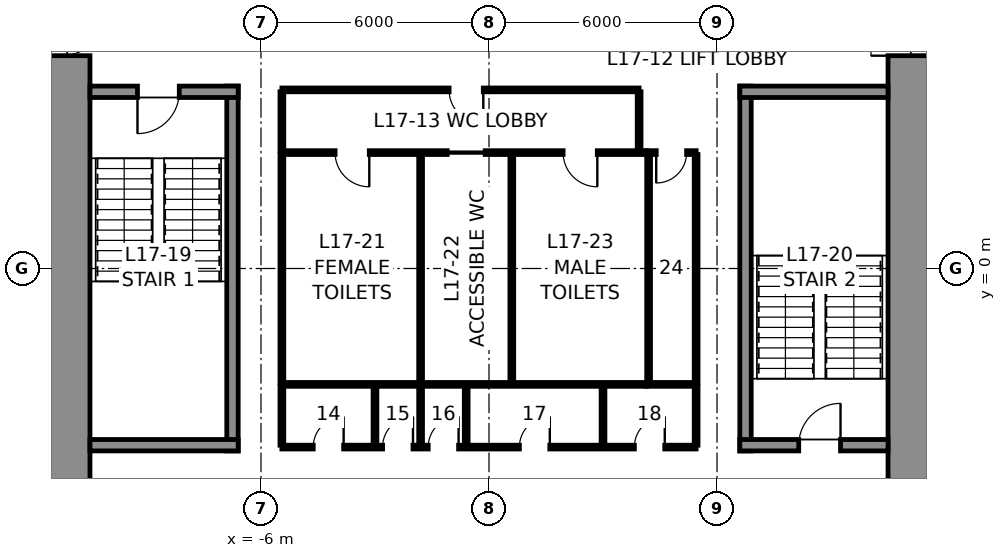
"""IFC4 building model, lengths in metres.
Left out: names, types, materials, properties, quantities, classifications, styles, units other than length and angle.
Written with IfcOpenShell. Run it as: python <this file> out.ifc"""

import sys

from ifc_helpers import new_model, si_unit, direction, frame, frame_2d, origin, place, context, subcontext, project, spatial, rectangle, extrude, element, fill, save


model = new_model("IFC4")
c1 = context("Model", 3, precision=1e-05, world=origin(), true_north=direction((0.0, 1.0)))
c2 = subcontext(c1, "Body", "Model", "MODEL_VIEW")
j1 = project(units=[si_unit("LENGTHUNIT", "METRE"), si_unit("PLANEANGLEUNIT", "RADIAN")], contexts=[c1])
p1 = place(None, origin())
s1 = spatial("IfcSite", under=j1, at=p1, CompositionType="ELEMENT")
p2 = place(p1, origin())
s2 = spatial("IfcBuilding", under=s1, at=p2, CompositionType="ELEMENT")
p3 = place(p2, frame((0.0, 0.0, 90.6)))
s3 = spatial("IfcBuildingStorey", under=s2, at=p3, CompositionType="ELEMENT", Elevation=90.6)
p4 = place(p3, frame((11.25, 10.5, 0.0), z_axis=(0.0, 0.0, 1.0), x_axis=(0.0, -1.0, 0.0)))
e1 = element("IfcWall", 1, at=p4, inside=s3, PredefinedType="SHEAR", context=c2, shape_type="SweptSolid", body=[
    extrude(rectangle(XDim=21.0, YDim=1.5, at=frame_2d((10.5, 0.0))), origin(), (0.0, 0.0, 1.0), 4.6),
])
p5 = place(p4, frame((3.7, 0.0, 0.0)))
e2 = element("IfcOpeningElement", 2, at=p5, cuts=e1, PredefinedType="OPENING", context=c2, shape_type="SweptSolid", body=[
    extrude(rectangle(XDim=1.2, YDim=2.3, at=frame_2d((0.6, 1.15))), frame((0.0, 0.76, 0.0), z_axis=(0.0, -1.0, 0.0), x_axis=(1.0, 0.0, 0.0)), (0.0, 0.0, 1.0), 1.52),
])
p6 = place(p4, frame((16.1, 0.0, 0.0)))
e3 = element("IfcOpeningElement", 3, at=p6, cuts=e1, PredefinedType="OPENING", context=c2, shape_type="SweptSolid", body=[
    extrude(rectangle(XDim=1.2, YDim=2.3, at=frame_2d((0.6, 1.15))), frame((0.0, 0.76, 0.0), z_axis=(0.0, -1.0, 0.0), x_axis=(1.0, 0.0, 0.0)), (0.0, 0.0, 1.0), 1.52),
])
p7 = place(p3, frame((-11.25, -10.5, 0.0), z_axis=(0.0, 0.0, 1.0), x_axis=(0.0, 1.0, 0.0)))
e4 = element("IfcWall", 4, at=p7, inside=s3, PredefinedType="SHEAR", context=c2, shape_type="SweptSolid", body=[
    extrude(rectangle(XDim=21.0, YDim=1.5, at=frame_2d((10.5, 0.0))), origin(), (0.0, 0.0, 1.0), 4.6),
])
p8 = place(p7, frame((16.1, 0.0, 0.0)))
e5 = element("IfcOpeningElement", 5, at=p8, cuts=e4, PredefinedType="OPENING", context=c2, shape_type="SweptSolid", body=[
    extrude(rectangle(XDim=1.2, YDim=2.3, at=frame_2d((0.6, 1.15))), frame((0.0, 0.76, 0.0), z_axis=(0.0, -1.0, 0.0), x_axis=(1.0, 0.0, 0.0)), (0.0, 0.0, 1.0), 1.52),
])
p9 = place(p7, frame((3.7, 0.0, 0.0)))
e6 = element("IfcOpeningElement", 6, at=p9, cuts=e4, PredefinedType="OPENING", context=c2, shape_type="SweptSolid", body=[
    extrude(rectangle(XDim=1.2, YDim=2.3, at=frame_2d((0.6, 1.15))), frame((0.0, 0.76, 0.0), z_axis=(0.0, -1.0, 0.0), x_axis=(1.0, 0.0, 0.0)), (0.0, 0.0, 1.0), 1.52),
])
p10 = place(p3, frame((-6.75, -4.8, 0.0), z_axis=(0.0, 0.0, 1.0), x_axis=(0.0, 1.0, 0.0)))
e7 = element("IfcWall", 7, at=p10, inside=s3, PredefinedType="SOLIDWALL", context=c2, shape_type="SweptSolid", body=[
    extrude(rectangle(XDim=9.6, YDim=0.3, at=frame_2d((4.8, 0.0))), origin(), (0.0, 0.0, 1.0), 4.35),
])
p11 = place(p3, frame((-10.5, 4.65, 0.0), z_axis=(0.0, 0.0, 1.0), x_axis=(1.0, 0.0, 0.0)))
e8 = element("IfcWall", 8, at=p11, inside=s3, PredefinedType="SOLIDWALL", context=c2, shape_type="SweptSolid", body=[
    extrude(rectangle(XDim=3.9, YDim=0.3, at=frame_2d((1.95, 0.0))), origin(), (0.0, 0.0, 1.0), 4.35),
])
p12 = place(p11, frame((1.25, 0.0, 0.0)))
e9 = element("IfcOpeningElement", 9, at=p12, cuts=e8, PredefinedType="OPENING", context=c2, shape_type="SweptSolid", body=[
    extrude(rectangle(XDim=1.1, YDim=2.3, at=frame_2d((0.55, 1.15))), frame((0.0, 0.16, 0.0), z_axis=(0.0, -1.0, 0.0), x_axis=(1.0, 0.0, 0.0)), (0.0, 0.0, 1.0), 0.32),
])
p13 = place(p3, frame((-6.6, -4.65, 0.0), z_axis=(0.0, 0.0, 1.0), x_axis=(-1.0, 0.0, 0.0)))
e10 = element("IfcWall", 10, at=p13, inside=s3, PredefinedType="SOLIDWALL", context=c2, shape_type="SweptSolid", body=[
    extrude(rectangle(XDim=3.9, YDim=0.3, at=frame_2d((1.95, 0.0))), origin(), (0.0, 0.0, 1.0), 4.35),
])
p14 = place(p3, frame((6.75, -4.8, 0.0), z_axis=(0.0, 0.0, 1.0), x_axis=(0.0, 1.0, 0.0)))
e11 = element("IfcWall", 11, at=p14, inside=s3, PredefinedType="SOLIDWALL", context=c2, shape_type="SweptSolid", body=[
    extrude(rectangle(XDim=9.6, YDim=0.3, at=frame_2d((4.8, 0.0))), origin(), (0.0, 0.0, 1.0), 4.35),
])
p15 = place(p3, frame((6.6, 4.65, 0.0), z_axis=(0.0, 0.0, 1.0), x_axis=(1.0, 0.0, 0.0)))
e12 = element("IfcWall", 12, at=p15, inside=s3, PredefinedType="SOLIDWALL", context=c2, shape_type="SweptSolid", body=[
    extrude(rectangle(XDim=3.9, YDim=0.3, at=frame_2d((1.95, 0.0))), origin(), (0.0, 0.0, 1.0), 4.35),
])
p16 = place(p3, frame((10.5, -4.65, 0.0), z_axis=(0.0, 0.0, 1.0), x_axis=(-1.0, 0.0, 0.0)))
e13 = element("IfcWall", 13, at=p16, inside=s3, PredefinedType="SOLIDWALL", context=c2, shape_type="SweptSolid", body=[
    extrude(rectangle(XDim=3.9, YDim=0.3, at=frame_2d((1.95, 0.0))), origin(), (0.0, 0.0, 1.0), 4.35),
])
p17 = place(p16, frame((1.25, 0.0, 0.0)))
e14 = element("IfcOpeningElement", 14, at=p17, cuts=e13, PredefinedType="OPENING", context=c2, shape_type="SweptSolid", body=[
    extrude(rectangle(XDim=1.1, YDim=2.3, at=frame_2d((0.55, 1.15))), frame((0.0, 0.16, 0.0), z_axis=(0.0, -1.0, 0.0), x_axis=(1.0, 0.0, 0.0)), (0.0, 0.0, 1.0), 0.32),
])
p18 = place(p3, frame((-5.45, 3.05, 0.0), z_axis=(0.0, 0.0, 1.0), x_axis=(1.0, 0.0, 0.0)))
e15 = element("IfcWall", 15, at=p18, inside=s3, PredefinedType="PARTITIONING", context=c2, shape_type="SweptSolid", body=[
    extrude(rectangle(XDim=9.6, YDim=0.1, at=frame_2d((4.8, 0.0))), origin(), (0.0, 0.0, 1.0), 4.35),
])
p19 = place(p18, frame((1.4, 0.0, 0.0)))
e16 = element("IfcOpeningElement", 16, at=p19, cuts=e15, PredefinedType="OPENING", context=c2, shape_type="SweptSolid", body=[
    extrude(rectangle(XDim=0.9, YDim=2.3, at=frame_2d((0.45, 1.15))), frame((0.0, 0.06, 0.0), z_axis=(0.0, -1.0, 0.0), x_axis=(1.0, 0.0, 0.0)), (0.0, 0.0, 1.0), 0.12),
])
p20 = place(p18, frame((4.35, 0.0, 0.0)))
e17 = element("IfcOpeningElement", 17, at=p20, cuts=e15, PredefinedType="OPENING", context=c2, shape_type="SweptSolid", body=[
    extrude(rectangle(XDim=1.0, YDim=2.3, at=frame_2d((0.5, 1.15))), frame((0.0, 0.06, 0.0), z_axis=(0.0, -1.0, 0.0), x_axis=(1.0, 0.0, 0.0)), (0.0, 0.0, 1.0), 0.12),
])
p21 = place(p18, frame((7.4, 0.0, 0.0)))
e18 = element("IfcOpeningElement", 18, at=p21, cuts=e15, PredefinedType="OPENING", context=c2, shape_type="SweptSolid", body=[
    extrude(rectangle(XDim=0.9, YDim=2.3, at=frame_2d((0.45, 1.15))), frame((0.0, 0.06, 0.0), z_axis=(0.0, -1.0, 0.0), x_axis=(1.0, 0.0, 0.0)), (0.0, 0.0, 1.0), 0.12),
])
p22 = place(p3, frame((4.15, 3.05, 0.0), z_axis=(0.0, 0.0, 1.0), x_axis=(1.0, 0.0, 0.0)))
e19 = element("IfcWall", 19, at=p22, inside=s3, PredefinedType="PARTITIONING", context=c2, shape_type="SweptSolid", body=[
    extrude(rectangle(XDim=1.3, YDim=0.1, at=frame_2d((0.65, 0.0))), origin(), (0.0, 0.0, 1.0), 4.35),
])
p23 = place(p22, frame((0.25, 0.0, 0.0)))
e20 = element("IfcOpeningElement", 20, at=p23, cuts=e19, PredefinedType="OPENING", context=c2, shape_type="SweptSolid", body=[
    extrude(rectangle(XDim=0.8, YDim=2.3, at=frame_2d((0.4, 1.15))), frame((0.0, 0.06, 0.0), z_axis=(0.0, -1.0, 0.0), x_axis=(1.0, 0.0, 0.0)), (0.0, 0.0, 1.0), 0.12),
])
p24 = place(p3, frame((4.15, -3.05, 0.0), z_axis=(0.0, 0.0, 1.0), x_axis=(-1.0, 0.0, 0.0)))
e21 = element("IfcWall", 21, at=p24, inside=s3, PredefinedType="PARTITIONING", context=c2, shape_type="SweptSolid", body=[
    extrude(rectangle(XDim=9.6, YDim=0.1, at=frame_2d((4.8, 0.0))), origin(), (0.0, 0.0, 1.0), 4.35),
])
p25 = place(p3, frame((5.45, -3.05, 0.0), z_axis=(0.0, 0.0, 1.0), x_axis=(-1.0, 0.0, 0.0)))
e22 = element("IfcWall", 22, at=p25, inside=s3, PredefinedType="PARTITIONING", context=c2, shape_type="SweptSolid", body=[
    extrude(rectangle(XDim=1.3, YDim=0.1, at=frame_2d((0.65, 0.0))), origin(), (0.0, 0.0, 1.0), 4.35),
])
for number, where, z_axis, x_axis in (
    (23, (5.45, 3.0, 0.0), (0.0, 0.0, 1.0), (0.0, -1.0, 0.0)),
    (24, (-5.45, -3.0, 0.0), (0.0, 0.0, 1.0), (0.0, 1.0, 0.0)),
    (25, (-1.8, -3.0, 0.0), (0.0, 0.0, 1.0), (0.0, 1.0, 0.0)),
    (26, (0.6, -3.0, 0.0), (0.0, 0.0, 1.0), (0.0, 1.0, 0.0)),
    (27, (4.2, -3.0, 0.0), (0.0, 0.0, 1.0), (0.0, 1.0, 0.0)),
):
    element("IfcWall", number, at=place(p3, frame(where, z_axis=z_axis, x_axis=x_axis)), inside=s3, PredefinedType="PARTITIONING", context=c2, shape_type="SweptSolid", body=[
        extrude(rectangle(XDim=6.0, YDim=0.1, at=frame_2d((3.0, 0.0))), origin(), (0.0, 0.0, 1.0), 4.35),
    ])
p26 = place(p3, frame((-5.45, 4.7, 0.0), z_axis=(0.0, 0.0, 1.0), x_axis=(1.0, 0.0, 0.0)))
e28 = element("IfcWall", 28, at=p26, inside=s3, PredefinedType="PARTITIONING", context=c2, shape_type="SweptSolid", body=[
    extrude(rectangle(XDim=9.4, YDim=0.1, at=frame_2d((4.7, 0.0))), origin(), (0.0, 0.0, 1.0), 4.35),
])
p27 = place(p26, frame((4.4, 0.0, 0.0)))
e29 = element("IfcOpeningElement", 29, at=p27, cuts=e28, PredefinedType="OPENING", context=c2, shape_type="SweptSolid", body=[
    extrude(rectangle(XDim=0.9, YDim=2.3, at=frame_2d((0.45, 1.15))), frame((0.0, 0.06, 0.0), z_axis=(0.0, -1.0, 0.0), x_axis=(1.0, 0.0, 0.0)), (0.0, 0.0, 1.0), 0.12),
])
for number, where, z_axis, x_axis in (
    (30, (-5.45, 3.1, 0.0), (0.0, 0.0, 1.0), (0.0, 1.0, 0.0)),
    (31, (3.95, 3.1, 0.0), (0.0, 0.0, 1.0), (0.0, 1.0, 0.0)),
):
    element("IfcWall", number, at=place(p3, frame(where, z_axis=z_axis, x_axis=x_axis)), inside=s3, PredefinedType="PARTITIONING", context=c2, shape_type="SweptSolid", body=[
        extrude(rectangle(XDim=1.55, YDim=0.1, at=frame_2d((0.775, 0.0))), origin(), (0.0, 0.0, 1.0), 4.35),
    ])
p28 = place(p3, frame((5.45, -4.7, 0.0), z_axis=(0.0, 0.0, 1.0), x_axis=(-1.0, 0.0, 0.0)))
e32 = element("IfcWall", 32, at=p28, inside=s3, PredefinedType="PARTITIONING", context=c2, shape_type="SweptSolid", body=[
    extrude(rectangle(XDim=10.9, YDim=0.1, at=frame_2d((5.45, 0.0))), origin(), (0.0, 0.0, 1.0), 4.35),
])
p29 = place(p28, frame((9.275, 0.0, 0.0)))
e33 = element("IfcOpeningElement", 33, at=p29, cuts=e32, PredefinedType="OPENING", context=c2, shape_type="SweptSolid", body=[
    extrude(rectangle(XDim=0.8, YDim=2.3, at=frame_2d((0.4, 1.15))), frame((0.0, 0.06, 0.0), z_axis=(0.0, -1.0, 0.0), x_axis=(1.0, 0.0, 0.0)), (0.0, 0.0, 1.0), 0.12),
])
p30 = place(p28, frame((7.45, 0.0, 0.0)))
e34 = element("IfcOpeningElement", 34, at=p30, cuts=e32, PredefinedType="OPENING", context=c2, shape_type="SweptSolid", body=[
    extrude(rectangle(XDim=0.8, YDim=2.3, at=frame_2d((0.4, 1.15))), frame((0.0, 0.06, 0.0), z_axis=(0.0, -1.0, 0.0), x_axis=(1.0, 0.0, 0.0)), (0.0, 0.0, 1.0), 0.12),
])
p31 = place(p28, frame((6.25, 0.0, 0.0)))
e35 = element("IfcOpeningElement", 35, at=p31, cuts=e32, PredefinedType="OPENING", context=c2, shape_type="SweptSolid", body=[
    extrude(rectangle(XDim=0.8, YDim=2.3, at=frame_2d((0.4, 1.15))), frame((0.0, 0.06, 0.0), z_axis=(0.0, -1.0, 0.0), x_axis=(1.0, 0.0, 0.0)), (0.0, 0.0, 1.0), 0.12),
])
p32 = place(p28, frame((3.85, 0.0, 0.0)))
e36 = element("IfcOpeningElement", 36, at=p32, cuts=e32, PredefinedType="OPENING", context=c2, shape_type="SweptSolid", body=[
    extrude(rectangle(XDim=0.8, YDim=2.3, at=frame_2d((0.4, 1.15))), frame((0.0, 0.06, 0.0), z_axis=(0.0, -1.0, 0.0), x_axis=(1.0, 0.0, 0.0)), (0.0, 0.0, 1.0), 0.12),
])
p33 = place(p28, frame((0.825, 0.0, 0.0)))
e37 = element("IfcOpeningElement", 37, at=p33, cuts=e32, PredefinedType="OPENING", context=c2, shape_type="SweptSolid", body=[
    extrude(rectangle(XDim=0.8, YDim=2.3, at=frame_2d((0.4, 1.15))), frame((0.0, 0.06, 0.0), z_axis=(0.0, -1.0, 0.0), x_axis=(1.0, 0.0, 0.0)), (0.0, 0.0, 1.0), 0.12),
])
for number, where, z_axis, x_axis in (
    (38, (-5.45, -3.1, 0.0), (0.0, 0.0, 1.0), (0.0, -1.0, 0.0)),
    (39, (5.45, -3.1, 0.0), (0.0, 0.0, 1.0), (0.0, -1.0, 0.0)),
    (40, (-3.0, -3.1, 0.0), (0.0, 0.0, 1.0), (0.0, -1.0, 0.0)),
    (41, (-1.8, -3.1, 0.0), (0.0, 0.0, 1.0), (0.0, -1.0, 0.0)),
    (42, (-0.6, -3.1, 0.0), (0.0, 0.0, 1.0), (0.0, -1.0, 0.0)),
    (43, (3.0, -3.1, 0.0), (0.0, 0.0, 1.0), (0.0, -1.0, 0.0)),
):
    element("IfcWall", number, at=place(p3, frame(where, z_axis=z_axis, x_axis=x_axis)), inside=s3, PredefinedType="PARTITIONING", context=c2, shape_type="SweptSolid", body=[
        extrude(rectangle(XDim=1.55, YDim=0.1, at=frame_2d((0.775, 0.0))), origin(), (0.0, 0.0, 1.0), 4.35),
    ])
p34 = place(p12, frame((1.1, 0.0, 0.0), z_axis=(0.0, 0.0, 1.0), x_axis=(-1.0, 0.0, 0.0)))
e44 = element("IfcDoor", 44, at=p34, inside=s3, OperationType="SINGLE_SWING_RIGHT", PredefinedType="DOOR", context=c2, shape_type="SweptSolid", body=[
    extrude(rectangle(XDim=1.1, YDim=2.3, at=frame_2d((0.55, 1.15))), frame((0.0, 0.025, 0.0), z_axis=(0.0, -1.0, 0.0), x_axis=(1.0, 0.0, 0.0)), (0.0, 0.0, 1.0), 0.05),
])
fill(e9, e44)
p35 = place(p17, frame((1.1, 0.0, 0.0), z_axis=(0.0, 0.0, 1.0), x_axis=(-1.0, 0.0, 0.0)))
e45 = element("IfcDoor", 45, at=p35, inside=s3, OperationType="SINGLE_SWING_RIGHT", PredefinedType="DOOR", context=c2, shape_type="SweptSolid", body=[
    extrude(rectangle(XDim=1.1, YDim=2.3, at=frame_2d((0.55, 1.15))), frame((0.0, 0.025, 0.0), z_axis=(0.0, -1.0, 0.0), x_axis=(1.0, 0.0, 0.0)), (0.0, 0.0, 1.0), 0.05),
])
fill(e14, e45)
p36 = place(p19, frame((0.9, 0.0, 0.0), z_axis=(0.0, 0.0, 1.0), x_axis=(-1.0, 0.0, 0.0)))
e46 = element("IfcDoor", 46, at=p36, inside=s3, OperationType="SINGLE_SWING_LEFT", PredefinedType="DOOR", context=c2, shape_type="SweptSolid", body=[
    extrude(rectangle(XDim=0.9, YDim=2.3, at=frame_2d((0.45, 1.15))), frame((0.0, 0.025, 0.0), z_axis=(0.0, -1.0, 0.0), x_axis=(1.0, 0.0, 0.0)), (0.0, 0.0, 1.0), 0.05),
])
fill(e16, e46)
p37 = place(p20, frame((1.0, 0.0, 0.0), z_axis=(0.0, 0.0, 1.0), x_axis=(-1.0, 0.0, 0.0)))
e47 = element("IfcDoor", 47, at=p37, inside=s3, OperationType="SLIDING_TO_LEFT", PredefinedType="DOOR", context=c2, shape_type="SweptSolid", body=[
    extrude(rectangle(XDim=1.0, YDim=2.3, at=frame_2d((0.5, 1.15))), frame((0.0, 0.025, 0.0), z_axis=(0.0, -1.0, 0.0), x_axis=(1.0, 0.0, 0.0)), (0.0, 0.0, 1.0), 0.05),
])
fill(e17, e47)
p38 = place(p21, frame((0.9, 0.0, 0.0), z_axis=(0.0, 0.0, 1.0), x_axis=(-1.0, 0.0, 0.0)))
e48 = element("IfcDoor", 48, at=p38, inside=s3, OperationType="SINGLE_SWING_LEFT", PredefinedType="DOOR", context=c2, shape_type="SweptSolid", body=[
    extrude(rectangle(XDim=0.9, YDim=2.3, at=frame_2d((0.45, 1.15))), frame((0.0, 0.025, 0.0), z_axis=(0.0, -1.0, 0.0), x_axis=(1.0, 0.0, 0.0)), (0.0, 0.0, 1.0), 0.05),
])
fill(e18, e48)
p39 = place(p23, frame((0.8, 0.0, 0.0), z_axis=(0.0, 0.0, 1.0), x_axis=(-1.0, 0.0, 0.0)))
e49 = element("IfcDoor", 49, at=p39, inside=s3, OperationType="SINGLE_SWING_RIGHT", PredefinedType="DOOR", context=c2, shape_type="SweptSolid", body=[
    extrude(rectangle(XDim=0.8, YDim=2.3, at=frame_2d((0.4, 1.15))), frame((0.0, 0.025, 0.0), z_axis=(0.0, -1.0, 0.0), x_axis=(1.0, 0.0, 0.0)), (0.0, 0.0, 1.0), 0.05),
])
fill(e20, e49)
p40 = place(p27, frame((0.9, 0.0, 0.0), z_axis=(0.0, 0.0, 1.0), x_axis=(-1.0, 0.0, 0.0)))
e50 = element("IfcDoor", 50, at=p40, inside=s3, OperationType="SINGLE_SWING_LEFT", PredefinedType="DOOR", context=c2, shape_type="SweptSolid", body=[
    extrude(rectangle(XDim=0.9, YDim=2.3, at=frame_2d((0.45, 1.15))), frame((0.0, 0.025, 0.0), z_axis=(0.0, -1.0, 0.0), x_axis=(1.0, 0.0, 0.0)), (0.0, 0.0, 1.0), 0.05),
])
fill(e29, e50)
p41 = place(p29, frame((0.8, 0.0, 0.0), z_axis=(0.0, 0.0, 1.0), x_axis=(-1.0, 0.0, 0.0)))
e51 = element("IfcDoor", 51, at=p41, inside=s3, OperationType="SINGLE_SWING_RIGHT", PredefinedType="DOOR", context=c2, shape_type="SweptSolid", body=[
    extrude(rectangle(XDim=0.8, YDim=2.3, at=frame_2d((0.4, 1.15))), frame((0.0, 0.025, 0.0), z_axis=(0.0, -1.0, 0.0), x_axis=(1.0, 0.0, 0.0)), (0.0, 0.0, 1.0), 0.05),
])
fill(e33, e51)
p42 = place(p30, frame((0.8, 0.0, 0.0), z_axis=(0.0, 0.0, 1.0), x_axis=(-1.0, 0.0, 0.0)))
e52 = element("IfcDoor", 52, at=p42, inside=s3, OperationType="SINGLE_SWING_RIGHT", PredefinedType="DOOR", context=c2, shape_type="SweptSolid", body=[
    extrude(rectangle(XDim=0.8, YDim=2.3, at=frame_2d((0.4, 1.15))), frame((0.0, 0.025, 0.0), z_axis=(0.0, -1.0, 0.0), x_axis=(1.0, 0.0, 0.0)), (0.0, 0.0, 1.0), 0.05),
])
fill(e34, e52)
p43 = place(p31, frame((0.8, 0.0, 0.0), z_axis=(0.0, 0.0, 1.0), x_axis=(-1.0, 0.0, 0.0)))
e53 = element("IfcDoor", 53, at=p43, inside=s3, OperationType="SINGLE_SWING_RIGHT", PredefinedType="DOOR", context=c2, shape_type="SweptSolid", body=[
    extrude(rectangle(XDim=0.8, YDim=2.3, at=frame_2d((0.4, 1.15))), frame((0.0, 0.025, 0.0), z_axis=(0.0, -1.0, 0.0), x_axis=(1.0, 0.0, 0.0)), (0.0, 0.0, 1.0), 0.05),
])
fill(e35, e53)
p44 = place(p32, frame((0.8, 0.0, 0.0), z_axis=(0.0, 0.0, 1.0), x_axis=(-1.0, 0.0, 0.0)))
e54 = element("IfcDoor", 54, at=p44, inside=s3, OperationType="SINGLE_SWING_RIGHT", PredefinedType="DOOR", context=c2, shape_type="SweptSolid", body=[
    extrude(rectangle(XDim=0.8, YDim=2.3, at=frame_2d((0.4, 1.15))), frame((0.0, 0.025, 0.0), z_axis=(0.0, -1.0, 0.0), x_axis=(1.0, 0.0, 0.0)), (0.0, 0.0, 1.0), 0.05),
])
fill(e36, e54)
p45 = place(p33, frame((0.8, 0.0, 0.0), z_axis=(0.0, 0.0, 1.0), x_axis=(-1.0, 0.0, 0.0)))
e55 = element("IfcDoor", 55, at=p45, inside=s3, OperationType="SINGLE_SWING_RIGHT", PredefinedType="DOOR", context=c2, shape_type="SweptSolid", body=[
    extrude(rectangle(XDim=0.8, YDim=2.3, at=frame_2d((0.4, 1.15))), frame((0.0, 0.025, 0.0), z_axis=(0.0, -1.0, 0.0), x_axis=(1.0, 0.0, 0.0)), (0.0, 0.0, 1.0), 0.05),
])
fill(e37, e55)
p46 = place(p8, frame((1.2, 0.0, 0.0), z_axis=(0.0, 0.0, 1.0), x_axis=(-1.0, 0.0, 0.0)))
e56 = element("IfcDoor", 56, at=p46, inside=s3, OperationType="SINGLE_SWING_LEFT", PredefinedType="DOOR", context=c2, shape_type="SweptSolid", body=[
    extrude(rectangle(XDim=1.2, YDim=2.3, at=frame_2d((0.6, 1.15))), frame((0.0, 0.025, 0.0), z_axis=(0.0, -1.0, 0.0), x_axis=(1.0, 0.0, 0.0)), (0.0, 0.0, 1.0), 0.05),
])
fill(e5, e56)
p47 = place(p5, frame((1.2, 0.0, 0.0), z_axis=(0.0, 0.0, 1.0), x_axis=(-1.0, 0.0, 0.0)))
e57 = element("IfcDoor", 57, at=p47, inside=s3, OperationType="SINGLE_SWING_LEFT", PredefinedType="DOOR", context=c2, shape_type="SweptSolid", body=[
    extrude(rectangle(XDim=1.2, YDim=2.3, at=frame_2d((0.6, 1.15))), frame((0.0, 0.025, 0.0), z_axis=(0.0, -1.0, 0.0), x_axis=(1.0, 0.0, 0.0)), (0.0, 0.0, 1.0), 0.05),
])
fill(e2, e57)
save(model, sys.argv[1])
